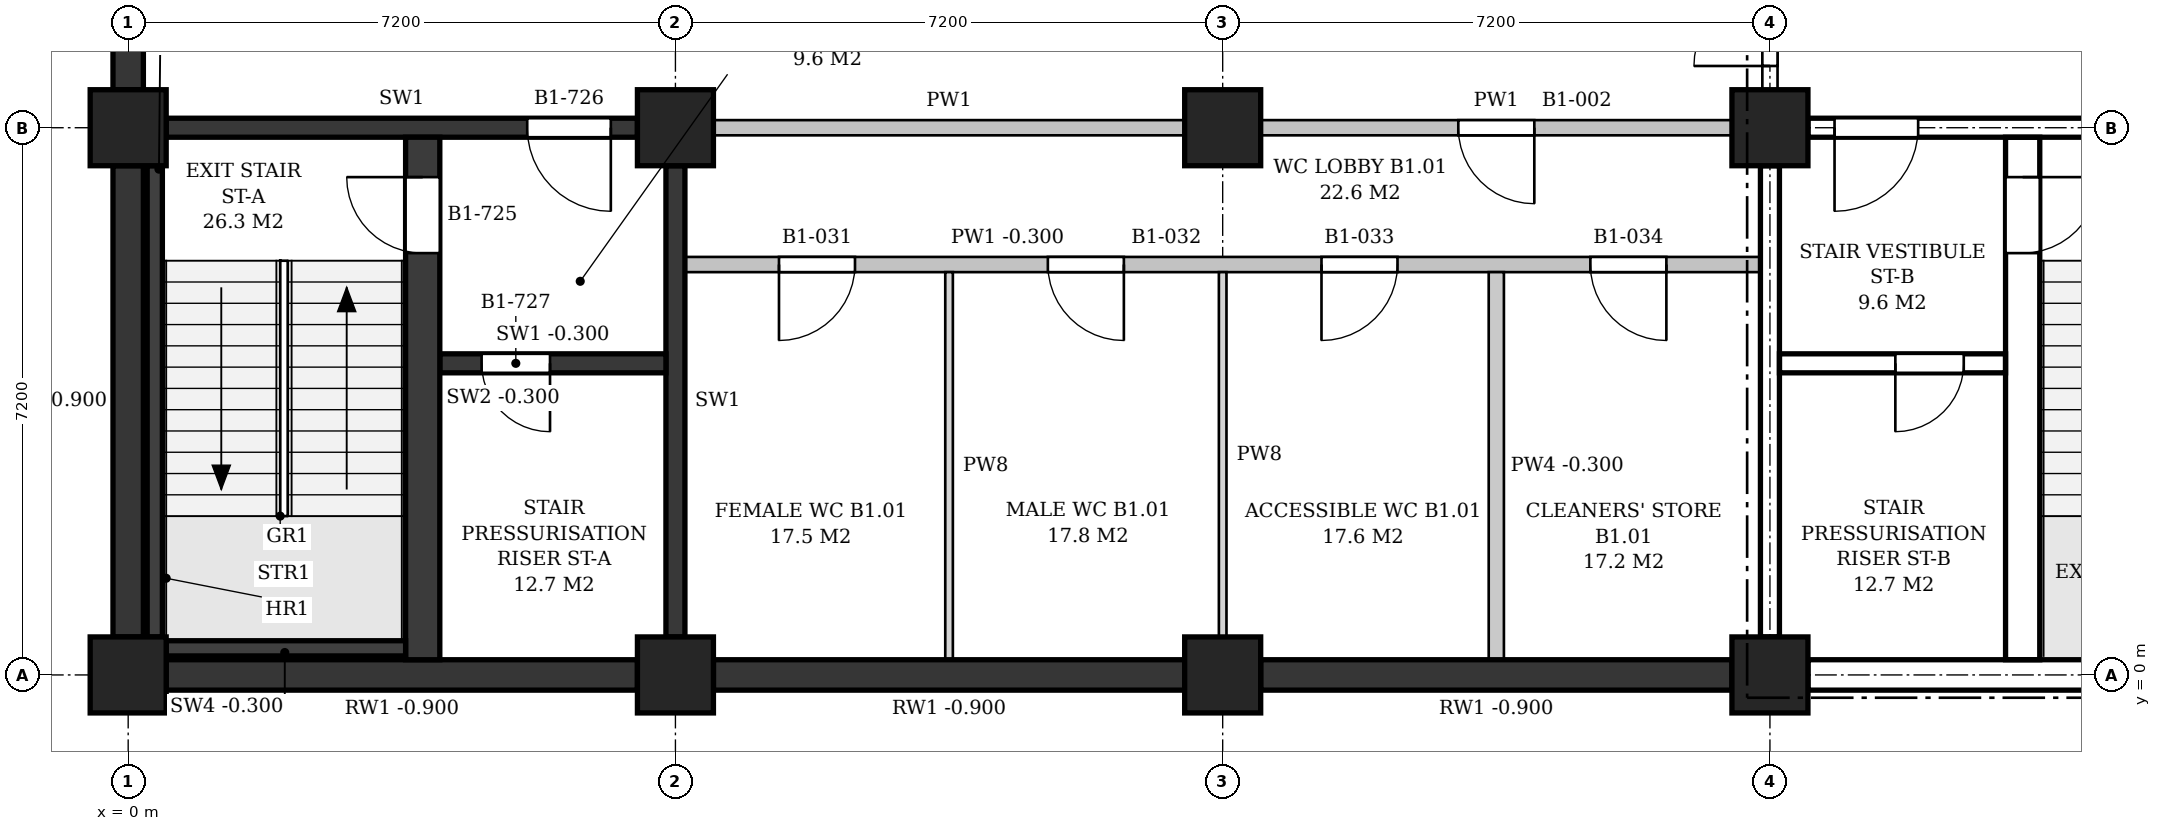
"""IFC4 building model, lengths in metres.
Left out: names, types, materials, properties, quantities, classifications, styles, units other than length and angle.
Written with IfcOpenShell. Run it as: python <this file> out.ifc"""

import sys

from ifc_helpers import new_model, si_unit, direction, frame, frame_2d, origin, origin_2d, place, context, subcontext, project, spatial, polyline, rectangle, outline, extrude, element, fill, save


model = new_model("IFC4")
c1 = context("Model", 3, precision=1e-05, world=origin(), true_north=direction((0.0, 1.0)))
c2 = subcontext(c1, "Body", "Model", "MODEL_VIEW")
j1 = project(units=[si_unit("LENGTHUNIT", "METRE"), si_unit("PLANEANGLEUNIT", "RADIAN")], contexts=[c1])
p1 = place(None, origin())
s1 = spatial("IfcSite", under=j1, at=p1, CompositionType="ELEMENT")
p2 = place(p1, origin())
s2 = spatial("IfcBuilding", under=s1, at=p2, CompositionType="ELEMENT")
p3 = place(p2, frame((0.0, 0.0, -4.5)))
s3 = spatial("IfcBuildingStorey", under=s2, at=p3, CompositionType="ELEMENT", Elevation=-4.5)
for number, where, z_axis, x_axis in (
    (1, (0.0, 0.0, 0.0), (0.0, 0.0, 1.0), (1.0, 0.0, 0.0)),
    (2, (0.0, 7.2, 0.0), (0.0, 0.0, 1.0), (1.0, 0.0, 0.0)),
    (3, (7.2, 0.0, 0.0), (0.0, 0.0, 1.0), (1.0, 0.0, 0.0)),
    (4, (7.2, 7.2, 0.0), (0.0, 0.0, 1.0), (1.0, 0.0, 0.0)),
    (5, (14.4, 0.0, 0.0), (0.0, 0.0, 1.0), (1.0, 0.0, 0.0)),
    (6, (14.4, 7.2, 0.0), (0.0, 0.0, 1.0), (1.0, 0.0, 0.0)),
    (7, (21.6, 0.0, 0.0), (0.0, 0.0, 1.0), (1.0, 0.0, 0.0)),
    (8, (21.6, 7.2, 0.0), (0.0, 0.0, 1.0), (1.0, 0.0, 0.0)),
):
    element("IfcColumn", number, at=place(p3, frame(where, z_axis=z_axis, x_axis=x_axis)), inside=s3, PredefinedType="COLUMN", context=c2, shape_type="SweptSolid", body=[
        extrude(rectangle(XDim=1.0, YDim=1.0, at=origin_2d()), origin(), (0.0, 0.0, 1.0), 4.5),
    ])
for number, where, z_axis, x_axis in (
    (9, (0.5, 0.0, 0.0), (0.0, 0.0, 1.0), (1.0, 0.0, 0.0)),
    (10, (7.7, 0.0, 0.0), (0.0, 0.0, 1.0), (1.0, 0.0, 0.0)),
):
    element("IfcWall", number, at=place(p3, frame(where, z_axis=z_axis, x_axis=x_axis)), inside=s3, PredefinedType="SOLIDWALL", context=c2, shape_type="SweptSolid", body=[
        extrude(rectangle(XDim=6.2, YDim=0.4, at=frame_2d((3.1, 0.0))), origin(), (0.0, 0.0, 1.0), 3.6),
    ])
p4 = place(p3, frame((14.9, 0.0, 0.0), z_axis=(0.0, 0.0, 1.0), x_axis=(1.0, 0.0, 0.0)))
e11 = element("IfcWall", 11, at=p4, inside=s3, PredefinedType="SOLIDWALL", context=c2, shape_type="SweptSolid", body=[
    extrude(rectangle(XDim=6.2, YDim=0.4, at=frame_2d((3.1, 0.0))), origin(), (0.0, 0.0, 1.0), 3.6),
])
for number, where, z_axis, x_axis in (
    (12, (22.1, 0.0, 0.0), (0.0, 0.0, 1.0), (1.0, 0.0, 0.0)),
    (13, (0.0, 13.9, 0.0), (0.0, 0.0, 1.0), (0.0, -1.0, 0.0)),
    (14, (0.0, 6.7, 0.0), (0.0, 0.0, 1.0), (0.0, -1.0, 0.0)),
):
    element("IfcWall", number, at=place(p3, frame(where, z_axis=z_axis, x_axis=x_axis)), inside=s3, PredefinedType="SOLIDWALL", context=c2, shape_type="SweptSolid", body=[
        extrude(rectangle(XDim=6.2, YDim=0.4, at=frame_2d((3.1, 0.0))), origin(), (0.0, 0.0, 1.0), 3.6),
    ])
p5 = place(p3, frame((0.5, 7.2, 0.0), z_axis=(0.0, 0.0, 1.0), x_axis=(1.0, 0.0, 0.0)))
e15 = element("IfcWall", 15, at=p5, inside=s3, PredefinedType="SHEAR", context=c2, shape_type="SweptSolid", body=[
    extrude(rectangle(XDim=6.2, YDim=0.25, at=frame_2d((3.1, 0.0))), origin(), (0.0, 0.0, 1.0), 3.4),
])
p6 = place(p5, frame((4.75, 0.0, 0.0)))
e16 = element("IfcOpeningElement", 16, at=p6, cuts=e15, PredefinedType="OPENING", context=c2, shape_type="SweptSolid", body=[
    extrude(rectangle(XDim=1.1, YDim=2.1, at=frame_2d((0.55, 1.05))), frame((0.0, 0.135, 0.0), z_axis=(0.0, -1.0, 0.0), x_axis=(1.0, 0.0, 0.0)), (0.0, 0.0, 1.0), 0.27),
])
p7 = place(p3, frame((7.2, 0.5, 0.0), z_axis=(0.0, 0.0, 1.0), x_axis=(0.0, 1.0, 0.0)))
e17 = element("IfcWall", 17, at=p7, inside=s3, PredefinedType="SHEAR", context=c2, shape_type="SweptSolid", body=[
    extrude(rectangle(XDim=6.2, YDim=0.25, at=frame_2d((3.1, 0.0))), origin(), (0.0, 0.0, 1.0), 3.4),
])
p8 = place(p3, frame((0.35, 0.5, 0.0), z_axis=(0.0, 0.0, 1.0), x_axis=(0.0, 1.0, 0.0)))
e18 = element("IfcWall", 18, at=p8, inside=s3, PredefinedType="SHEAR", context=c2, shape_type="SweptSolid", body=[
    extrude(rectangle(XDim=6.2, YDim=0.2, at=frame_2d((3.1, 0.0))), origin(), (0.0, 0.0, 1.0), 4.2),
])
p9 = place(p3, frame((0.5, 0.35, 0.0), z_axis=(0.0, 0.0, 1.0), x_axis=(1.0, 0.0, 0.0)))
e19 = element("IfcWall", 19, at=p9, inside=s3, PredefinedType="SHEAR", context=c2, shape_type="SweptSolid", body=[
    extrude(rectangle(XDim=3.15, YDim=0.2, at=frame_2d((1.575, 0.0))), origin(), (0.0, 0.0, 1.0), 4.2),
])
p10 = place(p3, frame((3.875, 0.2, 0.0), z_axis=(0.0, 0.0, 1.0), x_axis=(0.0, 1.0, 0.0)))
e20 = element("IfcWall", 20, at=p10, inside=s3, PredefinedType="SHEAR", context=c2, shape_type="SweptSolid", body=[
    extrude(rectangle(XDim=6.875, YDim=0.45, at=frame_2d((3.438, 0.0))), origin(), (0.0, 0.0, 1.0), 4.2),
])
p11 = place(p10, frame((5.35, 0.0, 0.0)))
e21 = element("IfcOpeningElement", 21, at=p11, cuts=e20, PredefinedType="OPENING", context=c2, shape_type="SweptSolid", body=[
    extrude(rectangle(XDim=1.0, YDim=2.1, at=frame_2d((0.5, 1.05))), frame((0.0, 0.235, 0.0), z_axis=(0.0, -1.0, 0.0), x_axis=(1.0, 0.0, 0.0)), (0.0, 0.0, 1.0), 0.47),
])
p12 = place(p3, frame((4.1, 4.1, 0.0), z_axis=(0.0, 0.0, 1.0), x_axis=(1.0, 0.0, 0.0)))
e22 = element("IfcWall", 22, at=p12, inside=s3, PredefinedType="SHEAR", context=c2, shape_type="SweptSolid", body=[
    extrude(rectangle(XDim=2.975, YDim=0.25, at=frame_2d((1.487, 0.0))), origin(), (0.0, 0.0, 1.0), 4.2),
])
p13 = place(p12, frame((0.55, 0.0, 0.0)))
e23 = element("IfcOpeningElement", 23, at=p13, cuts=e22, PredefinedType="OPENING", context=c2, shape_type="SweptSolid", body=[
    extrude(rectangle(XDim=0.9, YDim=2.1, at=frame_2d((0.45, 1.05))), frame((0.0, 0.135, 0.0), z_axis=(0.0, -1.0, 0.0), x_axis=(1.0, 0.0, 0.0)), (0.0, 0.0, 1.0), 0.27),
])
p14 = place(p3, frame((22.1, 7.2, 0.0), z_axis=(0.0, 0.0, 1.0), x_axis=(1.0, 0.0, 0.0)))
e24 = element("IfcWall", 24, at=p14, inside=s3, PredefinedType="SHEAR", context=c2, shape_type="SweptSolid", body=[
    extrude(rectangle(XDim=6.2, YDim=0.25, at=frame_2d((3.1, 0.0))), origin(), (0.0, 0.0, 1.0), 3.4),
])
p15 = place(p14, frame((0.35, 0.0, 0.0)))
e25 = element("IfcOpeningElement", 25, at=p15, cuts=e24, PredefinedType="OPENING", context=c2, shape_type="SweptSolid", body=[
    extrude(rectangle(XDim=1.1, YDim=2.1, at=frame_2d((0.55, 1.05))), frame((0.0, 0.135, 0.0), z_axis=(0.0, -1.0, 0.0), x_axis=(1.0, 0.0, 0.0)), (0.0, 0.0, 1.0), 0.27),
])
p16 = place(p3, frame((21.6, 0.5, 0.0), z_axis=(0.0, 0.0, 1.0), x_axis=(0.0, 1.0, 0.0)))
e26 = element("IfcWall", 26, at=p16, inside=s3, PredefinedType="SHEAR", context=c2, shape_type="SweptSolid", body=[
    extrude(rectangle(XDim=6.2, YDim=0.25, at=frame_2d((3.1, 0.0))), origin(), (0.0, 0.0, 1.0), 3.4),
])
p17 = place(p3, frame((24.925, 0.2, 0.0), z_axis=(0.0, 0.0, 1.0), x_axis=(0.0, 1.0, 0.0)))
e27 = element("IfcWall", 27, at=p17, inside=s3, PredefinedType="SHEAR", context=c2, shape_type="SweptSolid", body=[
    extrude(rectangle(XDim=6.875, YDim=0.45, at=frame_2d((3.438, 0.0))), origin(), (0.0, 0.0, 1.0), 4.2),
])
p18 = place(p17, frame((5.35, 0.0, 0.0)))
e28 = element("IfcOpeningElement", 28, at=p18, cuts=e27, PredefinedType="OPENING", context=c2, shape_type="SweptSolid", body=[
    extrude(rectangle(XDim=1.0, YDim=2.1, at=frame_2d((0.5, 1.05))), frame((0.0, 0.235, 0.0), z_axis=(0.0, -1.0, 0.0), x_axis=(1.0, 0.0, 0.0)), (0.0, 0.0, 1.0), 0.47),
])
p19 = place(p3, frame((21.725, 4.1, 0.0), z_axis=(0.0, 0.0, 1.0), x_axis=(1.0, 0.0, 0.0)))
e29 = element("IfcWall", 29, at=p19, inside=s3, PredefinedType="SHEAR", context=c2, shape_type="SweptSolid", body=[
    extrude(rectangle(XDim=2.975, YDim=0.25, at=frame_2d((1.487, 0.0))), origin(), (0.0, 0.0, 1.0), 4.2),
])
p20 = place(p19, frame((1.525, 0.0, 0.0)))
e30 = element("IfcOpeningElement", 30, at=p20, cuts=e29, PredefinedType="OPENING", context=c2, shape_type="SweptSolid", body=[
    extrude(rectangle(XDim=0.9, YDim=2.1, at=frame_2d((0.45, 1.05))), frame((0.0, 0.135, 0.0), z_axis=(0.0, -1.0, 0.0), x_axis=(1.0, 0.0, 0.0)), (0.0, 0.0, 1.0), 0.27),
])
p21 = place(p3, frame((7.325, 5.4, 0.0), z_axis=(0.0, 0.0, 1.0), x_axis=(1.0, 0.0, 0.0)))
e31 = element("IfcWall", 31, at=p21, inside=s3, PredefinedType="PARTITIONING", context=c2, shape_type="SweptSolid", body=[
    extrude(outline(polyline([(0.0, 0.0), (14.15, 0.0), (14.15, 3.4), (13.975, 3.4), (13.975, 4.2), (7.375, 4.2), (7.375, 3.4), (6.775, 3.4), (6.775, 4.2), (0.175, 4.2), (0.175, 3.4), (0.0, 3.4), (0.0, 0.0)])), frame((0.0, 0.1, 0.0), z_axis=(0.0, -1.0, 0.0), x_axis=(1.0, 0.0, 0.0)), (0.0, 0.0, 1.0), 0.2),
])
p22 = place(p21, frame((1.238, 0.0, 0.0)))
e32 = element("IfcOpeningElement", 32, at=p22, cuts=e31, PredefinedType="OPENING", context=c2, shape_type="SweptSolid", body=[
    extrude(rectangle(XDim=1.0, YDim=2.1, at=frame_2d((0.5, 1.05))), frame((0.0, 0.11, 0.0), z_axis=(0.0, -1.0, 0.0), x_axis=(1.0, 0.0, 0.0)), (0.0, 0.0, 1.0), 0.22),
])
p23 = place(p21, frame((4.775, 0.0, 0.0)))
e33 = element("IfcOpeningElement", 33, at=p23, cuts=e31, PredefinedType="OPENING", context=c2, shape_type="SweptSolid", body=[
    extrude(rectangle(XDim=1.0, YDim=2.1, at=frame_2d((0.5, 1.05))), frame((0.0, 0.11, 0.0), z_axis=(0.0, -1.0, 0.0), x_axis=(1.0, 0.0, 0.0)), (0.0, 0.0, 1.0), 0.22),
])
p24 = place(p21, frame((8.375, 0.0, 0.0)))
e34 = element("IfcOpeningElement", 34, at=p24, cuts=e31, PredefinedType="OPENING", context=c2, shape_type="SweptSolid", body=[
    extrude(rectangle(XDim=1.0, YDim=2.1, at=frame_2d((0.5, 1.05))), frame((0.0, 0.11, 0.0), z_axis=(0.0, -1.0, 0.0), x_axis=(1.0, 0.0, 0.0)), (0.0, 0.0, 1.0), 0.22),
])
p25 = place(p21, frame((11.913, 0.0, 0.0)))
e35 = element("IfcOpeningElement", 35, at=p25, cuts=e31, PredefinedType="OPENING", context=c2, shape_type="SweptSolid", body=[
    extrude(rectangle(XDim=1.0, YDim=2.1, at=frame_2d((0.5, 1.05))), frame((0.0, 0.11, 0.0), z_axis=(0.0, -1.0, 0.0), x_axis=(1.0, 0.0, 0.0)), (0.0, 0.0, 1.0), 0.22),
])
p26 = place(p3, frame((7.7, 7.2, 0.0), z_axis=(0.0, 0.0, 1.0), x_axis=(1.0, 0.0, 0.0)))
e36 = element("IfcWall", 36, at=p26, inside=s3, PredefinedType="PARTITIONING", context=c2, shape_type="SweptSolid", body=[
    extrude(rectangle(XDim=6.2, YDim=0.2, at=frame_2d((3.1, 0.0))), origin(), (0.0, 0.0, 1.0), 3.4),
])
p27 = place(p3, frame((14.9, 7.2, 0.0), z_axis=(0.0, 0.0, 1.0), x_axis=(1.0, 0.0, 0.0)))
e37 = element("IfcWall", 37, at=p27, inside=s3, PredefinedType="PARTITIONING", context=c2, shape_type="SweptSolid", body=[
    extrude(rectangle(XDim=6.2, YDim=0.2, at=frame_2d((3.1, 0.0))), origin(), (0.0, 0.0, 1.0), 3.4),
])
p28 = place(p27, frame((2.6, 0.0, 0.0)))
e38 = element("IfcOpeningElement", 38, at=p28, cuts=e37, PredefinedType="OPENING", context=c2, shape_type="SweptSolid", body=[
    extrude(rectangle(XDim=1.0, YDim=2.1, at=frame_2d((0.5, 1.05))), frame((0.0, 0.11, 0.0), z_axis=(0.0, -1.0, 0.0), x_axis=(1.0, 0.0, 0.0)), (0.0, 0.0, 1.0), 0.22),
])
p29 = place(p3, frame((10.8, 0.2, 0.0), z_axis=(0.0, 0.0, 1.0), x_axis=(0.0, 1.0, 0.0)))
e39 = element("IfcWall", 39, at=p29, inside=s3, PredefinedType="PARTITIONING", context=c2, shape_type="SweptSolid", body=[
    extrude(rectangle(XDim=5.1, YDim=0.1, at=frame_2d((2.55, 0.0))), origin(), (0.0, 0.0, 1.0), 3.4),
])
p30 = place(p3, frame((14.4, 0.5, 0.0), z_axis=(0.0, 0.0, 1.0), x_axis=(0.0, 1.0, 0.0)))
e40 = element("IfcWall", 40, at=p30, inside=s3, PredefinedType="PARTITIONING", context=c2, shape_type="SweptSolid", body=[
    extrude(rectangle(XDim=4.8, YDim=0.1, at=frame_2d((2.4, 0.0))), origin(), (0.0, 0.0, 1.0), 3.4),
])
p31 = place(p3, frame((18.0, 0.2, 0.0), z_axis=(0.0, 0.0, 1.0), x_axis=(0.0, 1.0, 0.0)))
e41 = element("IfcWall", 41, at=p31, inside=s3, PredefinedType="PARTITIONING", context=c2, shape_type="SweptSolid", body=[
    extrude(outline(polyline([(0.0, 0.0), (5.1, 0.0), (5.1, 4.2), (0.05, 4.2), (0.05, 3.6), (0.0, 3.6), (0.0, 0.0)])), frame((0.0, 0.1, 0.0), z_axis=(0.0, -1.0, 0.0), x_axis=(1.0, 0.0, 0.0)), (0.0, 0.0, 1.0), 0.2),
])
p32 = place(p3, frame((21.6, 7.7, 0.0), z_axis=(0.0, 0.0, 1.0), x_axis=(0.0, 1.0, 0.0)))
e42 = element("IfcWall", 42, at=p32, inside=s3, PredefinedType="PARTITIONING", context=c2, shape_type="SweptSolid", body=[
    extrude(rectangle(XDim=2.625, YDim=0.2, at=frame_2d((1.312, 0.0))), origin(), (0.0, 0.0, 1.0), 3.4),
])
p33 = place(p32, frame((0.312, 0.0, 0.0)))
e43 = element("IfcOpeningElement", 43, at=p33, cuts=e42, PredefinedType="OPENING", context=c2, shape_type="SweptSolid", body=[
    extrude(rectangle(XDim=2.0, YDim=2.4, at=frame_2d((1.0, 1.2))), frame((0.0, 0.11, 0.0), z_axis=(0.0, -1.0, 0.0), x_axis=(1.0, 0.0, 0.0)), (0.0, 0.0, 1.0), 0.22),
])
p34 = place(p11, origin())
e44 = element("IfcDoor", 44, at=p34, inside=s3, OperationType="SINGLE_SWING_RIGHT", PredefinedType="DOOR", context=c2, shape_type="SweptSolid", body=[
    extrude(rectangle(XDim=1.0, YDim=2.1, at=frame_2d((0.5, 1.05))), frame((0.0, 0.025, 0.0), z_axis=(0.0, -1.0, 0.0), x_axis=(1.0, 0.0, 0.0)), (0.0, 0.0, 1.0), 0.05),
])
fill(e21, e44)
p35 = place(p6, frame((1.1, 0.0, 0.0), z_axis=(0.0, 0.0, 1.0), x_axis=(-1.0, 0.0, 0.0)))
e45 = element("IfcDoor", 45, at=p35, inside=s3, OperationType="SINGLE_SWING_LEFT", PredefinedType="DOOR", context=c2, shape_type="SweptSolid", body=[
    extrude(rectangle(XDim=1.1, YDim=2.1, at=frame_2d((0.55, 1.05))), frame((0.0, 0.025, 0.0), z_axis=(0.0, -1.0, 0.0), x_axis=(1.0, 0.0, 0.0)), (0.0, 0.0, 1.0), 0.05),
])
fill(e16, e45)
p36 = place(p13, frame((0.9, 0.0, 0.0), z_axis=(0.0, 0.0, 1.0), x_axis=(-1.0, 0.0, 0.0)))
e46 = element("IfcDoor", 46, at=p36, inside=s3, OperationType="SINGLE_SWING_LEFT", PredefinedType="DOOR", context=c2, shape_type="SweptSolid", body=[
    extrude(rectangle(XDim=0.9, YDim=2.1, at=frame_2d((0.45, 1.05))), frame((0.0, 0.025, 0.0), z_axis=(0.0, -1.0, 0.0), x_axis=(1.0, 0.0, 0.0)), (0.0, 0.0, 1.0), 0.05),
])
fill(e23, e46)
p37 = place(p18, frame((1.0, 0.0, 0.0), z_axis=(0.0, 0.0, 1.0), x_axis=(-1.0, 0.0, 0.0)))
e47 = element("IfcDoor", 47, at=p37, inside=s3, OperationType="SINGLE_SWING_LEFT", PredefinedType="DOOR", context=c2, shape_type="SweptSolid", body=[
    extrude(rectangle(XDim=1.0, YDim=2.1, at=frame_2d((0.5, 1.05))), frame((0.0, 0.025, 0.0), z_axis=(0.0, -1.0, 0.0), x_axis=(1.0, 0.0, 0.0)), (0.0, 0.0, 1.0), 0.05),
])
fill(e28, e47)
p38 = place(p15, frame((1.1, 0.0, 0.0), z_axis=(0.0, 0.0, 1.0), x_axis=(-1.0, 0.0, 0.0)))
e48 = element("IfcDoor", 48, at=p38, inside=s3, OperationType="SINGLE_SWING_RIGHT", PredefinedType="DOOR", context=c2, shape_type="SweptSolid", body=[
    extrude(rectangle(XDim=1.1, YDim=2.1, at=frame_2d((0.55, 1.05))), frame((0.0, 0.025, 0.0), z_axis=(0.0, -1.0, 0.0), x_axis=(1.0, 0.0, 0.0)), (0.0, 0.0, 1.0), 0.05),
])
fill(e25, e48)
p39 = place(p20, frame((0.9, 0.0, 0.0), z_axis=(0.0, 0.0, 1.0), x_axis=(-1.0, 0.0, 0.0)))
e49 = element("IfcDoor", 49, at=p39, inside=s3, OperationType="SINGLE_SWING_RIGHT", PredefinedType="DOOR", context=c2, shape_type="SweptSolid", body=[
    extrude(rectangle(XDim=0.9, YDim=2.1, at=frame_2d((0.45, 1.05))), frame((0.0, 0.025, 0.0), z_axis=(0.0, -1.0, 0.0), x_axis=(1.0, 0.0, 0.0)), (0.0, 0.0, 1.0), 0.05),
])
fill(e30, e49)
p40 = place(p33, origin())
e50 = element("IfcDoor", 50, at=p40, inside=s3, OperationType="DOUBLE_DOOR_SINGLE_SWING", PredefinedType="DOOR", context=c2, shape_type="SweptSolid", body=[
    extrude(rectangle(XDim=2.0, YDim=2.4, at=frame_2d((1.0, 1.2))), frame((0.0, 0.025, 0.0), z_axis=(0.0, -1.0, 0.0), x_axis=(1.0, 0.0, 0.0)), (0.0, 0.0, 1.0), 0.05),
])
fill(e43, e50)
p41 = place(p28, frame((1.0, 0.0, 0.0), z_axis=(0.0, 0.0, 1.0), x_axis=(-1.0, 0.0, 0.0)))
e51 = element("IfcDoor", 51, at=p41, inside=s3, OperationType="SINGLE_SWING_LEFT", PredefinedType="DOOR", context=c2, shape_type="SweptSolid", body=[
    extrude(rectangle(XDim=1.0, YDim=2.1, at=frame_2d((0.5, 1.05))), frame((0.0, 0.025, 0.0), z_axis=(0.0, -1.0, 0.0), x_axis=(1.0, 0.0, 0.0)), (0.0, 0.0, 1.0), 0.05),
])
fill(e38, e51)
p42 = place(p22, frame((1.0, 0.0, 0.0), z_axis=(0.0, 0.0, 1.0), x_axis=(-1.0, 0.0, 0.0)))
e52 = element("IfcDoor", 52, at=p42, inside=s3, OperationType="SINGLE_SWING_RIGHT", PredefinedType="DOOR", context=c2, shape_type="SweptSolid", body=[
    extrude(rectangle(XDim=1.0, YDim=2.1, at=frame_2d((0.5, 1.05))), frame((0.0, 0.025, 0.0), z_axis=(0.0, -1.0, 0.0), x_axis=(1.0, 0.0, 0.0)), (0.0, 0.0, 1.0), 0.05),
])
fill(e32, e52)
p43 = place(p23, frame((1.0, 0.0, 0.0), z_axis=(0.0, 0.0, 1.0), x_axis=(-1.0, 0.0, 0.0)))
e53 = element("IfcDoor", 53, at=p43, inside=s3, OperationType="SINGLE_SWING_LEFT", PredefinedType="DOOR", context=c2, shape_type="SweptSolid", body=[
    extrude(rectangle(XDim=1.0, YDim=2.1, at=frame_2d((0.5, 1.05))), frame((0.0, 0.025, 0.0), z_axis=(0.0, -1.0, 0.0), x_axis=(1.0, 0.0, 0.0)), (0.0, 0.0, 1.0), 0.05),
])
fill(e33, e53)
p44 = place(p24, frame((1.0, 0.0, 0.0), z_axis=(0.0, 0.0, 1.0), x_axis=(-1.0, 0.0, 0.0)))
e54 = element("IfcDoor", 54, at=p44, inside=s3, OperationType="SINGLE_SWING_RIGHT", PredefinedType="DOOR", context=c2, shape_type="SweptSolid", body=[
    extrude(rectangle(XDim=1.0, YDim=2.1, at=frame_2d((0.5, 1.05))), frame((0.0, 0.025, 0.0), z_axis=(0.0, -1.0, 0.0), x_axis=(1.0, 0.0, 0.0)), (0.0, 0.0, 1.0), 0.05),
])
fill(e34, e54)
p45 = place(p25, frame((1.0, 0.0, 0.0), z_axis=(0.0, 0.0, 1.0), x_axis=(-1.0, 0.0, 0.0)))
e55 = element("IfcDoor", 55, at=p45, inside=s3, OperationType="SINGLE_SWING_LEFT", PredefinedType="DOOR", context=c2, shape_type="SweptSolid", body=[
    extrude(rectangle(XDim=1.0, YDim=2.1, at=frame_2d((0.5, 1.05))), frame((0.0, 0.025, 0.0), z_axis=(0.0, -1.0, 0.0), x_axis=(1.0, 0.0, 0.0)), (0.0, 0.0, 1.0), 0.05),
])
fill(e35, e55)
save(model, sys.argv[1])
